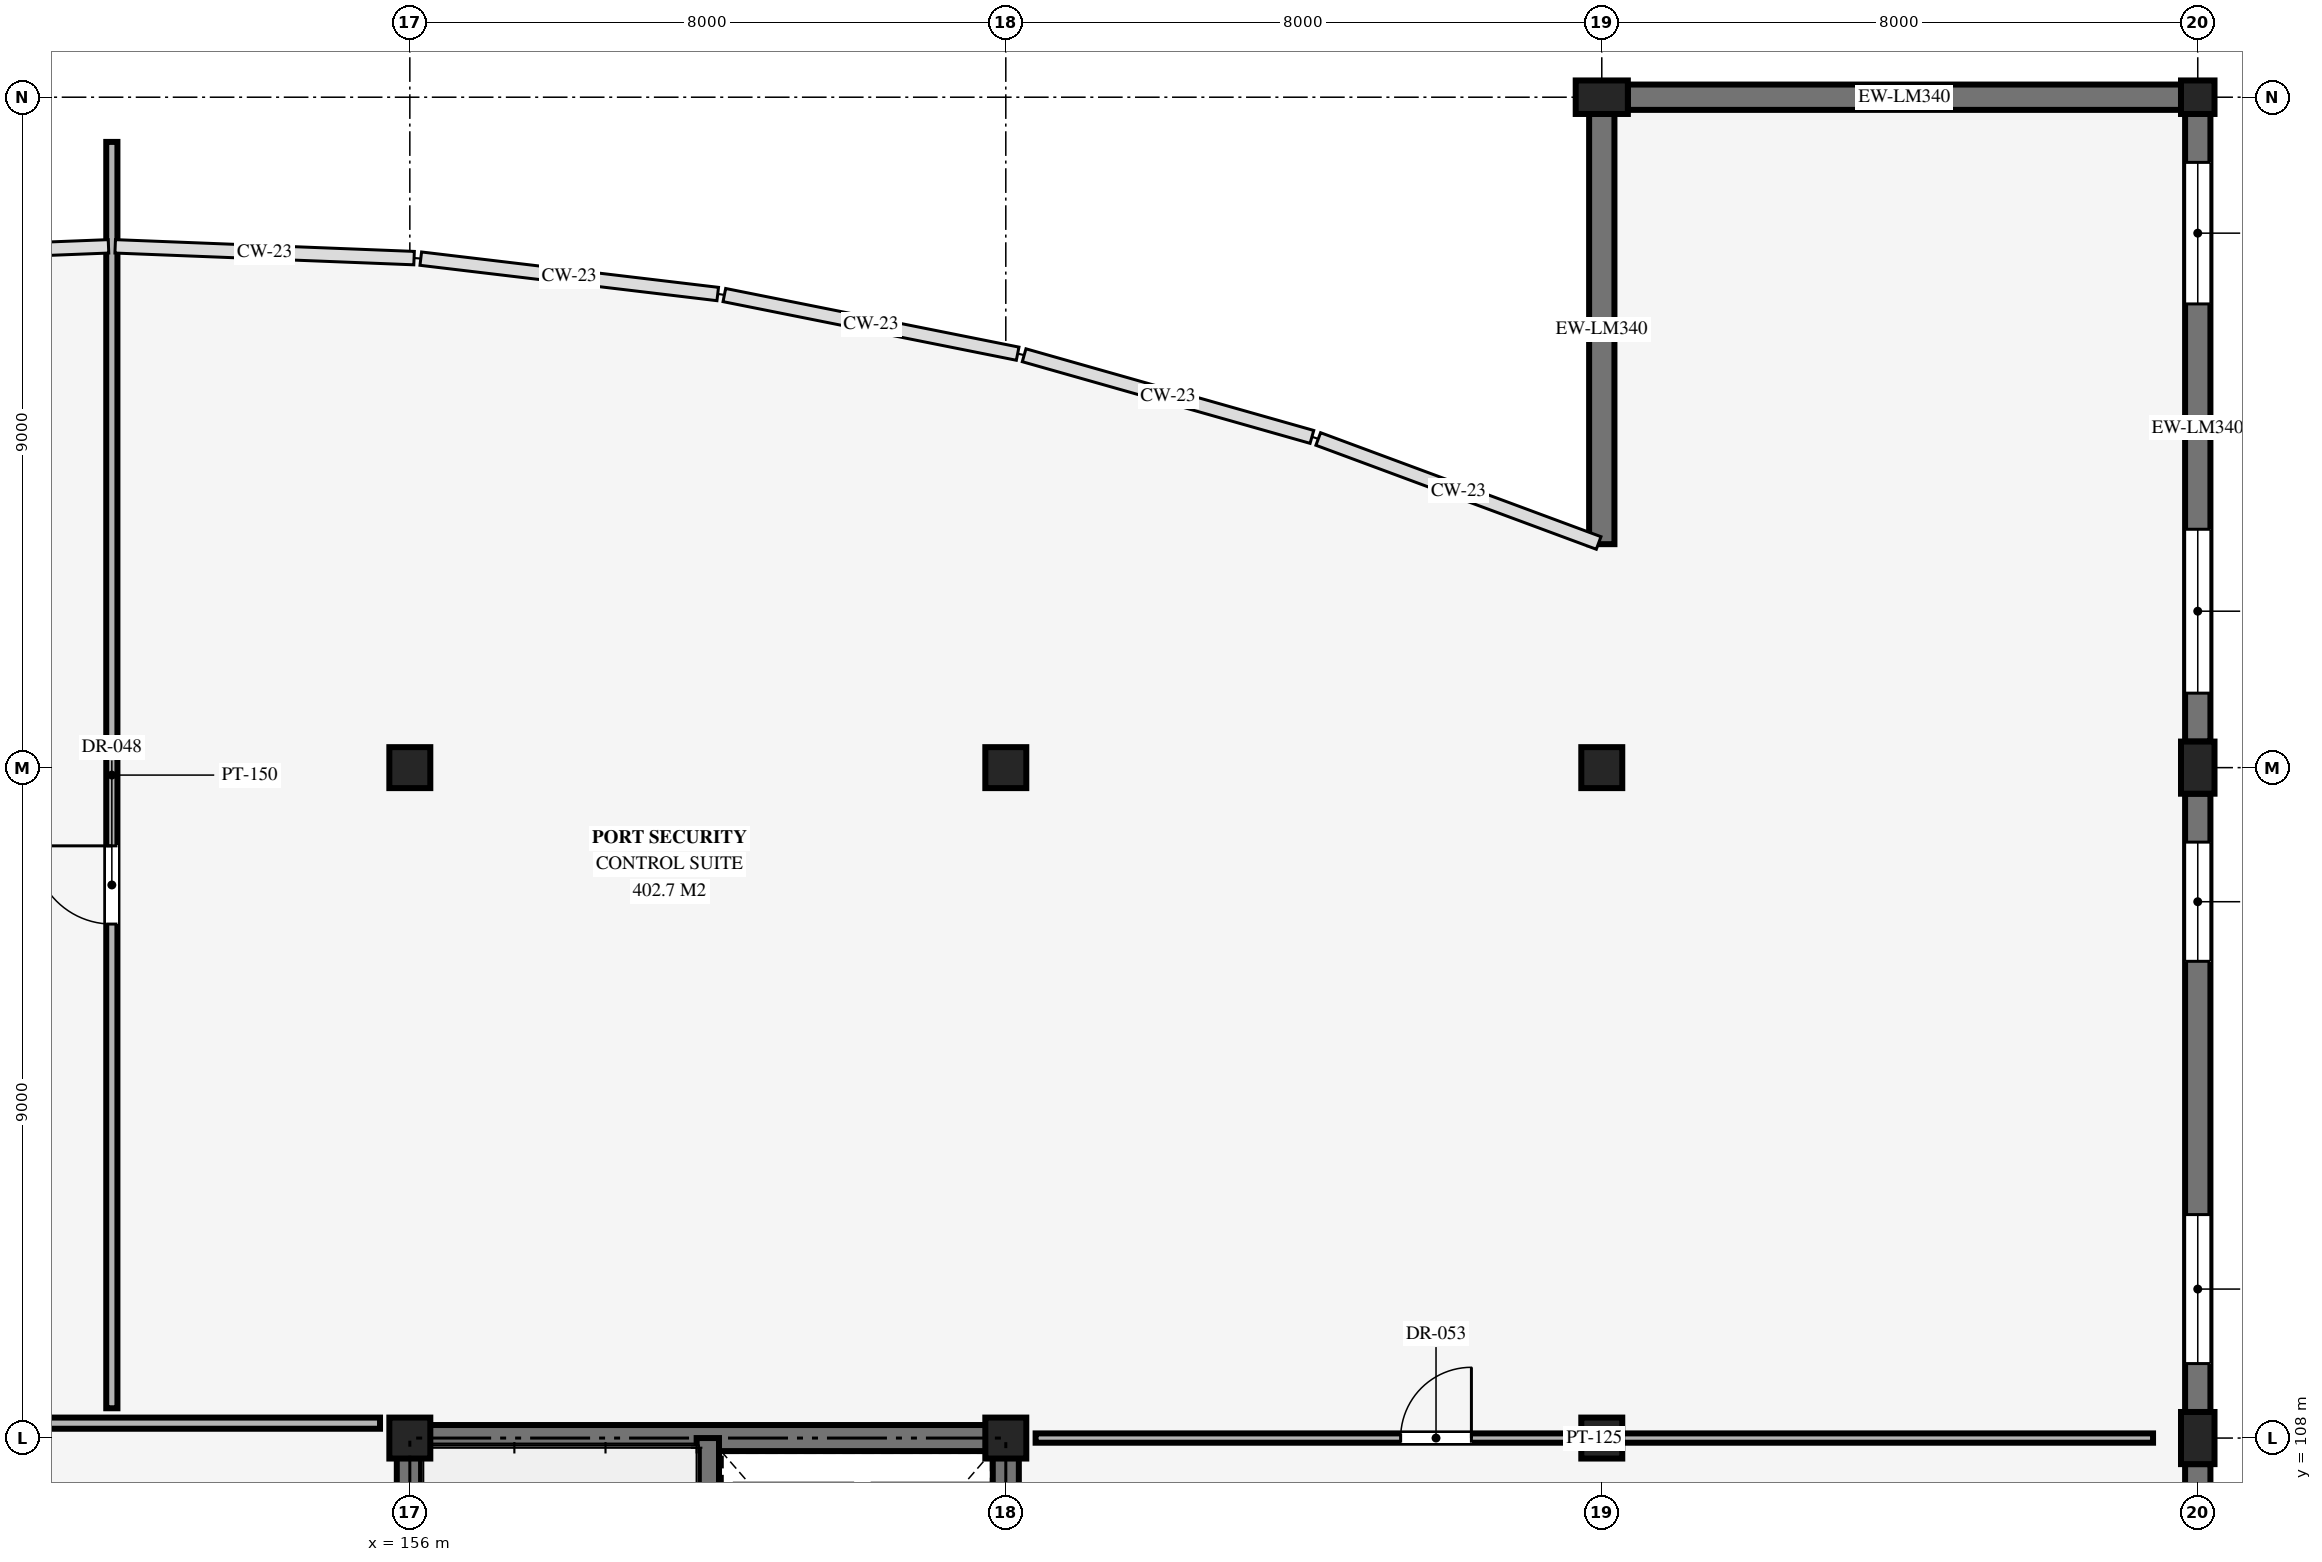
"""IFC4 building model, lengths in metres.
Left out: names, types, materials, properties, quantities, classifications, styles, units other than length and angle.
Written with IfcOpenShell. Run it as: python <this file> out.ifc"""

import sys

from ifc_helpers import new_model, si_unit, direction, frame, frame_2d, origin, origin_2d, place, context, subcontext, project, spatial, rectangle, extrude, element, fill, save


model = new_model("IFC4")
c1 = context("Model", 3, precision=1e-05, world=origin(), true_north=direction((0.0, 1.0)))
c2 = subcontext(c1, "Body", "Model", "MODEL_VIEW")
j1 = project(units=[si_unit("LENGTHUNIT", "METRE"), si_unit("PLANEANGLEUNIT", "RADIAN")], contexts=[c1])
p1 = place(None, origin())
s1 = spatial("IfcSite", under=j1, at=p1, CompositionType="ELEMENT")
p2 = place(p1, origin())
s2 = spatial("IfcBuilding", under=s1, at=p2, CompositionType="ELEMENT")
p3 = place(p2, frame((0.0, 0.0, 19.5)))
s3 = spatial("IfcBuildingStorey", under=s2, at=p3, CompositionType="ELEMENT", Elevation=19.5)
for number, where, z_axis, x_axis in (
    (1, (156.0, 108.0, 0.0), (0.0, 0.0, 1.0), (1.0, 0.0, 0.0)),
    (2, (156.0, 117.0, 0.0), (0.0, 0.0, 1.0), (1.0, 0.0, 0.0)),
    (3, (164.0, 108.0, 0.0), (0.0, 0.0, 1.0), (1.0, 0.0, 0.0)),
    (4, (164.0, 117.0, 0.0), (0.0, 0.0, 1.0), (1.0, 0.0, 0.0)),
    (5, (172.0, 108.0, 0.0), (0.0, 0.0, 1.0), (1.0, 0.0, 0.0)),
    (6, (172.0, 117.0, 0.0), (0.0, 0.0, 1.0), (1.0, 0.0, 0.0)),
):
    element("IfcColumn", number, at=place(p3, frame(where, z_axis=z_axis, x_axis=x_axis)), inside=s3, PredefinedType="COLUMN", context=c2, shape_type="SweptSolid", body=[
        extrude(rectangle(XDim=0.55, YDim=0.55, at=origin_2d()), origin(), (0.0, 0.0, 1.0), 4.04),
    ])
for number, where, z_axis, x_axis in (
    (7, (172.0, 126.0, 0.0), (0.0, 0.0, 1.0), (0.0, 1.0, 0.0)),
    (8, (180.0, 108.0, 0.0), (0.0, 0.0, 1.0), (1.0, 0.0, 0.0)),
    (9, (180.0, 117.0, 0.0), (0.0, 0.0, 1.0), (1.0, 0.0, 0.0)),
):
    element("IfcColumn", number, at=place(p3, frame(where, z_axis=z_axis, x_axis=x_axis)), inside=s3, PredefinedType="PILASTER", context=c2, shape_type="SweptSolid", body=[
        extrude(rectangle(XDim=0.45, YDim=0.7, at=origin_2d()), origin(), (0.0, 0.0, 1.0), 4.04),
    ])
p4 = place(p3, frame((180.0, 126.0, 0.0), z_axis=(0.0, 0.0, 1.0), x_axis=(1.0, 0.0, 0.0)))
e10 = element("IfcColumn", 10, at=p4, inside=s3, PredefinedType="COLUMN", context=c2, shape_type="SweptSolid", body=[
    extrude(rectangle(XDim=0.45, YDim=0.45, at=origin_2d()), origin(), (0.0, 0.0, 1.0), 4.04),
])
p5 = place(p3, frame((180.0, 99.35, 0.0), z_axis=(0.0, 0.0, 1.0), x_axis=(0.0, 1.0, 0.0)))
e11 = element("IfcWall", 11, at=p5, inside=s3, PredefinedType="SOLIDWALL", context=c2, shape_type="SweptSolid", body=[
    extrude(rectangle(XDim=8.3, YDim=0.34, at=frame_2d((4.15, 0.0))), origin(), (0.0, 0.0, 1.0), 3.94),
])
p6 = place(p5, frame((0.65, 0.0, 0.95)))
e12 = element("IfcOpeningElement", 12, at=p6, cuts=e11, PredefinedType="OPENING", context=c2, shape_type="SweptSolid", body=[
    extrude(rectangle(XDim=2.6, YDim=1.6, at=frame_2d((1.3, 0.8))), frame((0.0, 0.18, 0.0), z_axis=(0.0, -1.0, 0.0), x_axis=(1.0, 0.0, 0.0)), (0.0, 0.0, 1.0), 0.36),
])
p7 = place(p5, frame((4.65, 0.0, 0.95)))
e13 = element("IfcOpeningElement", 13, at=p7, cuts=e11, PredefinedType="OPENING", context=c2, shape_type="SweptSolid", body=[
    extrude(rectangle(XDim=3.0, YDim=1.4, at=frame_2d((1.5, 0.7))), frame((0.0, 0.18, 0.0), z_axis=(0.0, -1.0, 0.0), x_axis=(1.0, 0.0, 0.0)), (0.0, 0.0, 1.0), 0.36),
])
p8 = place(p3, frame((180.0, 108.35, 0.0), z_axis=(0.0, 0.0, 1.0), x_axis=(0.0, 1.0, 0.0)))
e14 = element("IfcWall", 14, at=p8, inside=s3, PredefinedType="SOLIDWALL", context=c2, shape_type="SweptSolid", body=[
    extrude(rectangle(XDim=8.3, YDim=0.34, at=frame_2d((4.15, 0.0))), origin(), (0.0, 0.0, 1.0), 3.94),
])
p9 = place(p8, frame((0.65, 0.0, 0.95)))
e15 = element("IfcOpeningElement", 15, at=p9, cuts=e14, PredefinedType="OPENING", context=c2, shape_type="SweptSolid", body=[
    extrude(rectangle(XDim=2.0, YDim=1.2, at=frame_2d((1.0, 0.6))), frame((0.0, 0.18, 0.0), z_axis=(0.0, -1.0, 0.0), x_axis=(1.0, 0.0, 0.0)), (0.0, 0.0, 1.0), 0.36),
])
p10 = place(p8, frame((6.05, 0.0, 0.95)))
e16 = element("IfcOpeningElement", 16, at=p10, cuts=e14, PredefinedType="OPENING", context=c2, shape_type="SweptSolid", body=[
    extrude(rectangle(XDim=1.6, YDim=2.0, at=frame_2d((0.8, 1.0))), frame((0.0, 0.18, 0.0), z_axis=(0.0, -1.0, 0.0), x_axis=(1.0, 0.0, 0.0)), (0.0, 0.0, 1.0), 0.36),
])
p11 = place(p3, frame((180.0, 117.35, 0.0), z_axis=(0.0, 0.0, 1.0), x_axis=(0.0, 1.0, 0.0)))
e17 = element("IfcWall", 17, at=p11, inside=s3, PredefinedType="SOLIDWALL", context=c2, shape_type="SweptSolid", body=[
    extrude(rectangle(XDim=8.425, YDim=0.34, at=frame_2d((4.212, 0.0))), origin(), (0.0, 0.0, 1.0), 3.94),
])
p12 = place(p11, frame((0.65, 0.0, 0.95)))
e18 = element("IfcOpeningElement", 18, at=p12, cuts=e17, PredefinedType="OPENING", context=c2, shape_type="SweptSolid", body=[
    extrude(rectangle(XDim=2.2, YDim=1.9, at=frame_2d((1.1, 0.95))), frame((0.0, 0.18, 0.0), z_axis=(0.0, -1.0, 0.0), x_axis=(1.0, 0.0, 0.0)), (0.0, 0.0, 1.0), 0.36),
])
p13 = place(p11, frame((5.875, 0.0, 0.95)))
e19 = element("IfcOpeningElement", 19, at=p13, cuts=e17, PredefinedType="OPENING", context=c2, shape_type="SweptSolid", body=[
    extrude(rectangle(XDim=1.9, YDim=1.9, at=frame_2d((0.95, 0.95))), frame((0.0, 0.18, 0.0), z_axis=(0.0, -1.0, 0.0), x_axis=(1.0, 0.0, 0.0)), (0.0, 0.0, 1.0), 0.36),
])
p14 = place(p3, frame((172.0, 120.0, 0.0), z_axis=(0.0, 0.0, 1.0), x_axis=(0.0, 1.0, 0.0)))
e20 = element("IfcWall", 20, at=p14, inside=s3, PredefinedType="SOLIDWALL", context=c2, shape_type="SweptSolid", body=[
    extrude(rectangle(XDim=5.775, YDim=0.34, at=frame_2d((2.887, 0.0))), origin(), (0.0, 0.0, 1.0), 3.94),
])
p15 = place(p3, frame((172.35, 126.0, 0.0), z_axis=(0.0, 0.0, 1.0), x_axis=(1.0, 0.0, 0.0)))
e21 = element("IfcWall", 21, at=p15, inside=s3, PredefinedType="SOLIDWALL", context=c2, shape_type="SweptSolid", body=[
    extrude(rectangle(XDim=7.425, YDim=0.34, at=frame_2d((3.712, 0.0))), origin(), (0.0, 0.0, 1.0), 3.94),
])
p16 = place(p3, frame((156.0, 108.0, 0.0), z_axis=(0.0, 0.0, 1.0), x_axis=(1.0, 0.0, 0.0)))
e22 = element("IfcWall", 22, at=p16, inside=s3, PredefinedType="SHEAR", context=c2, shape_type="SweptSolid", body=[
    extrude(rectangle(XDim=8.0, YDim=0.35, at=frame_2d((4.0, 0.0))), origin(), (0.0, 0.0, 1.0), 4.18),
])
p17 = place(p3, frame((156.0, 99.0, 0.0), z_axis=(0.0, 0.0, 1.0), x_axis=(0.0, 1.0, 0.0)))
e23 = element("IfcWall", 23, at=p17, inside=s3, PredefinedType="SHEAR", context=c2, shape_type="SweptSolid", body=[
    extrude(rectangle(XDim=9.0, YDim=0.35, at=frame_2d((4.5, 0.0))), origin(), (0.0, 0.0, 1.0), 4.18),
])
p18 = place(p3, frame((164.0, 99.0, 0.0), z_axis=(0.0, 0.0, 1.0), x_axis=(0.0, 1.0, 0.0)))
e24 = element("IfcWall", 24, at=p18, inside=s3, PredefinedType="SHEAR", context=c2, shape_type="SweptSolid", body=[
    extrude(rectangle(XDim=9.0, YDim=0.35, at=frame_2d((4.5, 0.0))), origin(), (0.0, 0.0, 1.0), 4.18),
])
p19 = place(p18, frame((1.4, 0.0, 0.0)))
e25 = element("IfcOpeningElement", 25, at=p19, cuts=e24, PredefinedType="OPENING", context=c2, shape_type="SweptSolid", body=[
    extrude(rectangle(XDim=1.5, YDim=2.2, at=frame_2d((0.75, 1.1))), frame((0.0, 0.185, 0.0), z_axis=(0.0, -1.0, 0.0), x_axis=(1.0, 0.0, 0.0)), (0.0, 0.0, 1.0), 0.37),
])
p20 = place(p3, frame((160.0, 108.0, 0.0), z_axis=(0.0, 0.0, 1.0), x_axis=(0.0, -1.0, 0.0)))
e26 = element("IfcWall", 26, at=p20, inside=s3, PredefinedType="SHEAR", context=c2, shape_type="SweptSolid", body=[
    extrude(rectangle(XDim=9.0, YDim=0.3, at=frame_2d((4.5, 0.0))), origin(), (0.0, 0.0, 1.0), 4.18),
])
p21 = place(p20, frame((7.45, 0.0, 0.0)))
e27 = element("IfcOpeningElement", 27, at=p21, cuts=e26, PredefinedType="OPENING", context=c2, shape_type="SweptSolid", body=[
    extrude(rectangle(XDim=1.05, YDim=2.15, at=frame_2d((0.525, 1.075))), frame((0.0, 0.16, 0.0), z_axis=(0.0, -1.0, 0.0), x_axis=(1.0, 0.0, 0.0)), (0.0, 0.0, 1.0), 0.32),
])
p22 = place(p3, frame((152.0, 108.4, 0.0), z_axis=(0.0, 0.0, 1.0), x_axis=(0.0, 1.0, 0.0)))
e28 = element("IfcWall", 28, at=p22, inside=s3, PredefinedType="PARTITIONING", context=c2, shape_type="SweptSolid", body=[
    extrude(rectangle(XDim=17.0, YDim=0.15, at=frame_2d((8.5, 0.0))), origin(), (0.0, 0.0, 1.0), 3.2),
])
p23 = place(p22, frame((6.5, 0.0, 0.0)))
e29 = element("IfcOpeningElement", 29, at=p23, cuts=e28, PredefinedType="OPENING", context=c2, shape_type="SweptSolid", body=[
    extrude(rectangle(XDim=1.05, YDim=2.15, at=frame_2d((0.525, 1.075))), frame((0.0, 0.085, 0.0), z_axis=(0.0, -1.0, 0.0), x_axis=(1.0, 0.0, 0.0)), (0.0, 0.0, 1.0), 0.17),
])
p24 = place(p3, frame((120.6, 108.2, 0.0), z_axis=(0.0, 0.0, 1.0), x_axis=(1.0, 0.0, 0.0)))
e30 = element("IfcWall", 30, at=p24, inside=s3, PredefinedType="PARTITIONING", context=c2, shape_type="SweptSolid", body=[
    extrude(rectangle(XDim=35.0, YDim=0.15, at=frame_2d((17.5, 0.0))), origin(), (0.0, 0.0, 1.0), 3.2),
])
p25 = place(p24, frame((8.0, 0.0, 0.0)))
e31 = element("IfcOpeningElement", 31, at=p25, cuts=e30, PredefinedType="OPENING", context=c2, shape_type="SweptSolid", body=[
    extrude(rectangle(XDim=1.4, YDim=2.15, at=frame_2d((0.7, 1.075))), frame((0.0, 0.085, 0.0), z_axis=(0.0, -1.0, 0.0), x_axis=(1.0, 0.0, 0.0)), (0.0, 0.0, 1.0), 0.17),
])
p26 = place(p24, frame((29.0, 0.0, 0.0)))
e32 = element("IfcOpeningElement", 32, at=p26, cuts=e30, PredefinedType="OPENING", context=c2, shape_type="SweptSolid", body=[
    extrude(rectangle(XDim=1.0, YDim=2.15, at=frame_2d((0.5, 1.075))), frame((0.0, 0.085, 0.0), z_axis=(0.0, -1.0, 0.0), x_axis=(1.0, 0.0, 0.0)), (0.0, 0.0, 1.0), 0.17),
])
p27 = place(p3, frame((164.4, 108.0, 0.0), z_axis=(0.0, 0.0, 1.0), x_axis=(1.0, 0.0, 0.0)))
e33 = element("IfcWall", 33, at=p27, inside=s3, PredefinedType="PARTITIONING", context=c2, shape_type="SweptSolid", body=[
    extrude(rectangle(XDim=15.0, YDim=0.125, at=frame_2d((7.5, 0.0))), origin(), (0.0, 0.0, 1.0), 3.2),
])
p28 = place(p27, frame((4.9, 0.0, 0.0)))
e34 = element("IfcOpeningElement", 34, at=p28, cuts=e33, PredefinedType="OPENING", context=c2, shape_type="SweptSolid", body=[
    extrude(rectangle(XDim=0.95, YDim=2.1, at=frame_2d((0.475, 1.05))), frame((0.0, 0.073, 0.0), z_axis=(0.0, -1.0, 0.0), x_axis=(1.0, 0.0, 0.0)), (0.0, 0.0, 1.0), 0.145),
])
p29 = place(p9, origin())
e35 = element("IfcWindow", 35, at=p29, inside=s3, PartitioningType="SINGLE_PANEL", PredefinedType="WINDOW", context=c2, shape_type="SweptSolid", body=[
    extrude(rectangle(XDim=2.0, YDim=1.2, at=frame_2d((1.0, 0.6))), frame((0.0, 0.03, 0.0), z_axis=(0.0, -1.0, 0.0), x_axis=(1.0, 0.0, 0.0)), (0.0, 0.0, 1.0), 0.06),
])
fill(e15, e35)
p30 = place(p10, origin())
e36 = element("IfcWindow", 36, at=p30, inside=s3, PartitioningType="SINGLE_PANEL", PredefinedType="WINDOW", context=c2, shape_type="SweptSolid", body=[
    extrude(rectangle(XDim=1.6, YDim=2.0, at=frame_2d((0.8, 1.0))), frame((0.0, 0.03, 0.0), z_axis=(0.0, -1.0, 0.0), x_axis=(1.0, 0.0, 0.0)), (0.0, 0.0, 1.0), 0.06),
])
fill(e16, e36)
p31 = place(p12, origin())
e37 = element("IfcWindow", 37, at=p31, inside=s3, PartitioningType="SINGLE_PANEL", PredefinedType="WINDOW", context=c2, shape_type="SweptSolid", body=[
    extrude(rectangle(XDim=2.2, YDim=1.9, at=frame_2d((1.1, 0.95))), frame((0.0, 0.03, 0.0), z_axis=(0.0, -1.0, 0.0), x_axis=(1.0, 0.0, 0.0)), (0.0, 0.0, 1.0), 0.06),
])
fill(e18, e37)
p32 = place(p13, origin())
e38 = element("IfcWindow", 38, at=p32, inside=s3, PartitioningType="SINGLE_PANEL", PredefinedType="WINDOW", context=c2, shape_type="SweptSolid", body=[
    extrude(rectangle(XDim=1.9, YDim=1.9, at=frame_2d((0.95, 0.95))), frame((0.0, 0.03, 0.0), z_axis=(0.0, -1.0, 0.0), x_axis=(1.0, 0.0, 0.0)), (0.0, 0.0, 1.0), 0.06),
])
fill(e19, e38)
p33 = place(p23, origin())
e39 = element("IfcDoor", 39, at=p33, inside=s3, OperationType="SINGLE_SWING_RIGHT", PredefinedType="DOOR", context=c2, shape_type="SweptSolid", body=[
    extrude(rectangle(XDim=1.05, YDim=2.15, at=frame_2d((0.525, 1.075))), frame((0.0, 0.025, 0.0), z_axis=(0.0, -1.0, 0.0), x_axis=(1.0, 0.0, 0.0)), (0.0, 0.0, 1.0), 0.05),
])
fill(e29, e39)
p34 = place(p28, origin())
e40 = element("IfcDoor", 40, at=p34, inside=s3, OperationType="SINGLE_SWING_RIGHT", PredefinedType="DOOR", context=c2, shape_type="SweptSolid", body=[
    extrude(rectangle(XDim=0.95, YDim=2.1, at=frame_2d((0.475, 1.05))), frame((0.0, 0.025, 0.0), z_axis=(0.0, -1.0, 0.0), x_axis=(1.0, 0.0, 0.0)), (0.0, 0.0, 1.0), 0.05),
])
fill(e34, e40)
save(model, sys.argv[1])
